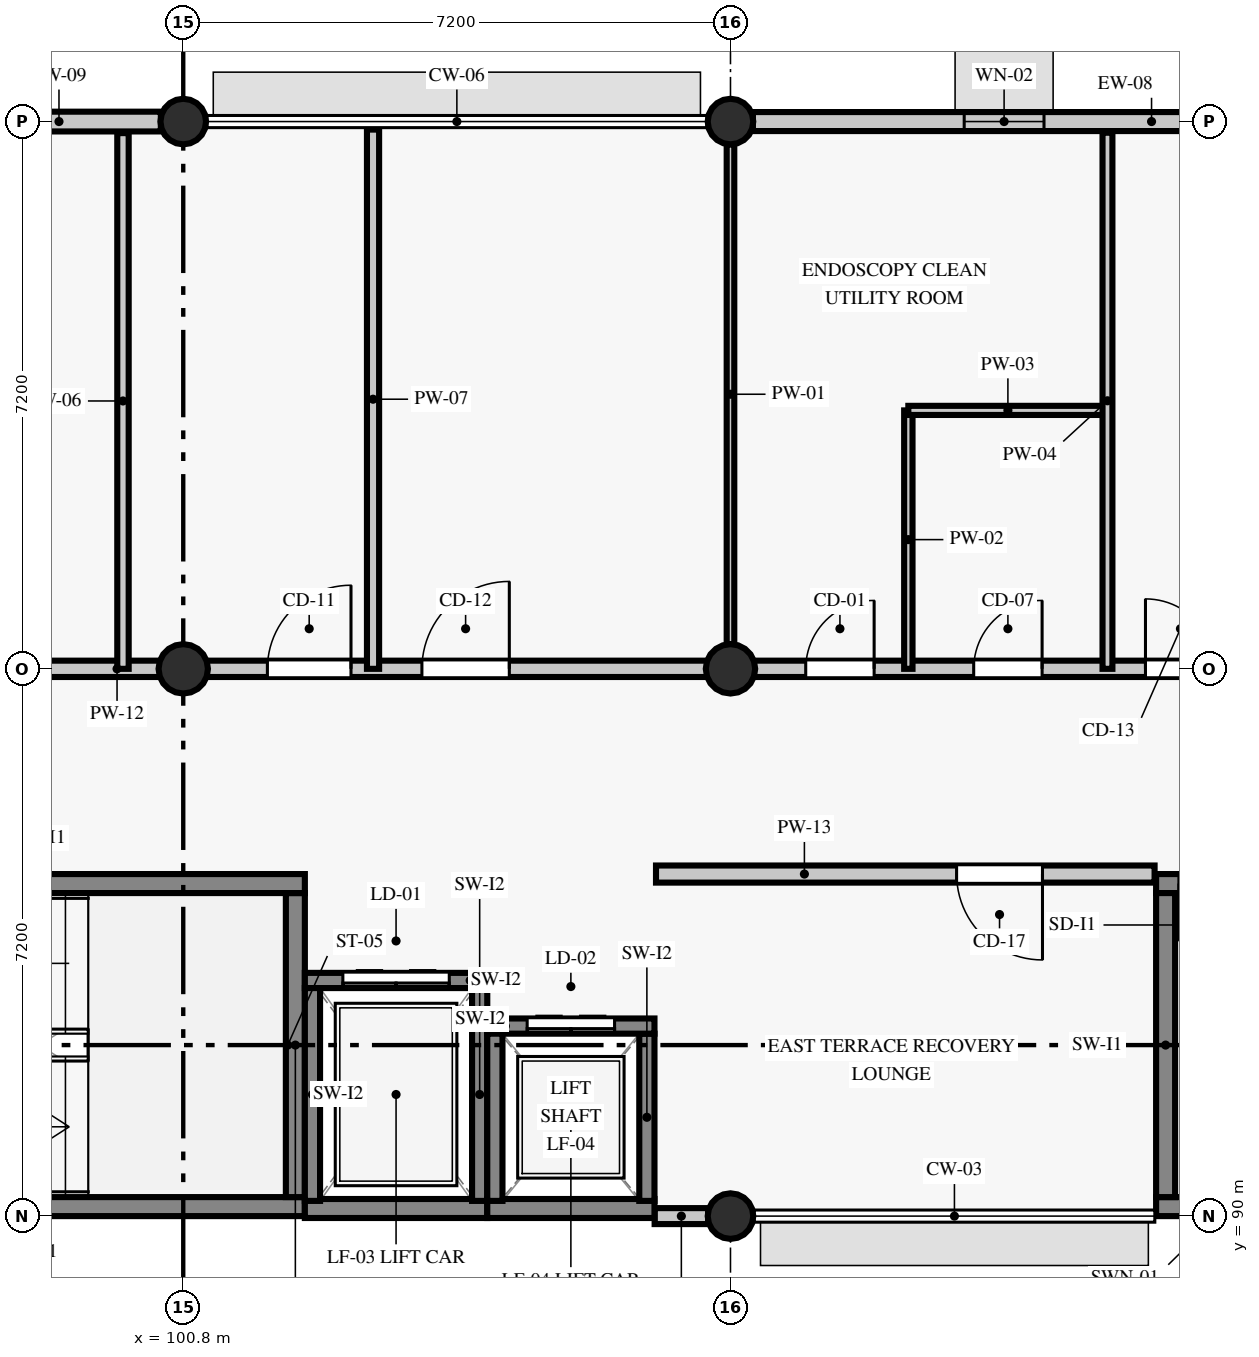
"""IFC4 building model, lengths in metres.
Left out: names, types, materials, properties, quantities, classifications, styles, units other than length and angle.
Written with IfcOpenShell. Run it as: python <this file> out.ifc"""

import sys

from ifc_helpers import new_model, si_unit, direction, frame, frame_2d, origin, origin_2d, place, context, subcontext, project, spatial, rectangle, circle, extrude, element, fill, save


model = new_model("IFC4")
c1 = context("Model", 3, precision=1e-05, world=origin(), true_north=direction((0.0, 1.0)))
c2 = subcontext(c1, "Body", "Model", "MODEL_VIEW")
j1 = project(units=[si_unit("LENGTHUNIT", "METRE"), si_unit("PLANEANGLEUNIT", "RADIAN")], contexts=[c1])
p1 = place(None, origin())
s1 = spatial("IfcSite", under=j1, at=p1, CompositionType="ELEMENT")
p2 = place(p1, origin())
s2 = spatial("IfcBuilding", under=s1, at=p2, CompositionType="ELEMENT")
p3 = place(p2, frame((0.0, 0.0, 9.6)))
s3 = spatial("IfcBuildingStorey", under=s2, at=p3, CompositionType="ELEMENT", Elevation=9.6)
p4 = place(p3, frame((100.8, 97.2, 0.0), z_axis=(0.0, 0.0, 1.0), x_axis=(1.0, 0.0, 0.0)))
e1 = element("IfcColumn", 1, at=p4, inside=s3, PredefinedType="COLUMN", context=c2, shape_type="SweptSolid", body=[
    extrude(circle(Radius=0.325, at=origin_2d()), origin(), (0.0, 0.0, 1.0), 3.925),
])
for number, where, z_axis, x_axis in (
    (2, (100.8, 104.4, 0.0), (0.0, 0.0, 1.0), (1.0, 0.0, 0.0)),
    (3, (108.0, 90.0, 0.0), (0.0, 0.0, 1.0), (1.0, 0.0, 0.0)),
):
    element("IfcColumn", number, at=place(p3, frame(where, z_axis=z_axis, x_axis=x_axis)), inside=s3, PredefinedType="COLUMN", context=c2, shape_type="SweptSolid", body=[
        extrude(circle(Radius=0.3, at=origin_2d()), origin(), (0.0, 0.0, 1.0), 3.925),
    ])
p5 = place(p3, frame((108.0, 97.2, 0.0), z_axis=(0.0, 0.0, 1.0), x_axis=(1.0, 0.0, 0.0)))
e4 = element("IfcColumn", 4, at=p5, inside=s3, PredefinedType="COLUMN", context=c2, shape_type="SweptSolid", body=[
    extrude(circle(Radius=0.325, at=origin_2d()), origin(), (0.0, 0.0, 1.0), 3.925),
])
p6 = place(p3, frame((108.0, 104.4, 0.0), z_axis=(0.0, 0.0, 1.0), x_axis=(1.0, 0.0, 0.0)))
e5 = element("IfcColumn", 5, at=p6, inside=s3, PredefinedType="COLUMN", context=c2, shape_type="SweptSolid", body=[
    extrude(circle(Radius=0.3, at=origin_2d()), origin(), (0.0, 0.0, 1.0), 3.925),
])
p7 = place(p3, frame((107.002, 90.0, 0.0), z_axis=(0.0, 0.0, 1.0), x_axis=(1.0, 0.0, 0.0)))
e6 = element("IfcWall", 6, at=p7, inside=s3, PredefinedType="STANDARD", context=c2, shape_type="SweptSolid", body=[
    extrude(rectangle(XDim=0.703, YDim=0.21, at=frame_2d((0.352, 0.0))), origin(), (0.0, 0.0, 1.0), 3.925),
])
p8 = place(p3, frame((114.905, 104.4, 0.0), z_axis=(0.0, 0.0, 1.0), x_axis=(-1.0, 0.0, 0.0)))
e7 = element("IfcWall", 7, at=p8, inside=s3, PredefinedType="STANDARD", context=c2, shape_type="SweptSolid", body=[
    extrude(rectangle(XDim=6.61, YDim=0.25, at=frame_2d((3.305, 0.0))), origin(), (0.0, 0.0, 1.0), 3.275),
])
p9 = place(p8, frame((2.78, 0.0, 0.9)))
e8 = element("IfcOpeningElement", 8, at=p9, cuts=e7, PredefinedType="OPENING", context=c2, shape_type="SweptSolid", body=[
    extrude(rectangle(XDim=1.05, YDim=1.3, at=frame_2d((0.525, 0.65))), frame((0.0, 0.135, 0.0), z_axis=(0.0, -1.0, 0.0), x_axis=(1.0, 0.0, 0.0)), (0.0, 0.0, 1.0), 0.27),
])
p10 = place(p3, frame((100.505, 104.4, 0.0), z_axis=(0.0, 0.0, 1.0), x_axis=(-1.0, 0.0, 0.0)))
e9 = element("IfcWall", 9, at=p10, inside=s3, PredefinedType="STANDARD", context=c2, shape_type="SweptSolid", body=[
    extrude(rectangle(XDim=6.61, YDim=0.26, at=frame_2d((3.305, 0.0))), origin(), (0.0, 0.0, 1.0), 3.275),
])
p11 = place(p10, frame((2.73, 0.0, 0.9)))
e10 = element("IfcOpeningElement", 10, at=p11, cuts=e9, PredefinedType="OPENING", context=c2, shape_type="SweptSolid", body=[
    extrude(rectangle(XDim=1.15, YDim=1.3, at=frame_2d((0.575, 0.65))), frame((0.0, 0.14, 0.0), z_axis=(0.0, -1.0, 0.0), x_axis=(1.0, 0.0, 0.0)), (0.0, 0.0, 1.0), 0.28),
])
p12 = place(p3, frame((93.6, 90.125, 0.0), z_axis=(0.0, 0.0, 1.0), x_axis=(1.0, 0.0, 0.0)))
e11 = element("IfcWall", 11, at=p12, inside=s3, PredefinedType="SHEAR", context=c2, shape_type="SweptSolid", body=[
    extrude(rectangle(XDim=8.8, YDim=0.25, at=frame_2d((4.4, 0.0))), origin(), (0.0, 0.0, 1.0), 3.925),
])
p13 = place(p12, frame((0.35, 0.0, 0.92)))
e12 = element("IfcOpeningElement", 12, at=p13, cuts=e11, PredefinedType="OPENING", context=c2, shape_type="SweptSolid", body=[
    extrude(rectangle(XDim=1.18, YDim=1.48, at=frame_2d((0.59, 0.74))), frame((0.0, 0.135, 0.0), z_axis=(0.0, -1.0, 0.0), x_axis=(1.0, 0.0, 0.0)), (0.0, 0.0, 1.0), 0.27),
])
p14 = place(p3, frame((102.275, 90.25, 0.0), z_axis=(0.0, 0.0, 1.0), x_axis=(0.0, 1.0, 0.0)))
e13 = element("IfcWall", 13, at=p14, inside=s3, PredefinedType="SHEAR", context=c2, shape_type="SweptSolid", body=[
    extrude(rectangle(XDim=4.0, YDim=0.25, at=frame_2d((2.0, 0.0))), origin(), (0.0, 0.0, 1.0), 3.925),
])
p15 = place(p3, frame((102.4, 94.375, 0.0), z_axis=(0.0, 0.0, 1.0), x_axis=(-1.0, 0.0, 0.0)))
e14 = element("IfcWall", 14, at=p15, inside=s3, PredefinedType="SHEAR", context=c2, shape_type="SweptSolid", body=[
    extrude(rectangle(XDim=8.8, YDim=0.25, at=frame_2d((4.4, 0.0))), origin(), (0.0, 0.0, 1.0), 3.925),
])
p16 = place(p15, frame((7.0, 0.0, 0.0)))
e15 = element("IfcOpeningElement", 15, at=p16, cuts=e14, PredefinedType="OPENING", context=c2, shape_type="SweptSolid", body=[
    extrude(rectangle(XDim=1.5, YDim=2.15, at=frame_2d((0.75, 1.075))), frame((0.0, 0.135, 0.0), z_axis=(0.0, -1.0, 0.0), x_axis=(1.0, 0.0, 0.0)), (0.0, 0.0, 1.0), 0.27),
])
p17 = place(p3, frame((113.6, 90.125, 0.0), z_axis=(0.0, 0.0, 1.0), x_axis=(1.0, 0.0, 0.0)))
e16 = element("IfcWall", 16, at=p17, inside=s3, PredefinedType="SHEAR", context=c2, shape_type="SweptSolid", body=[
    extrude(rectangle(XDim=8.8, YDim=0.25, at=frame_2d((4.4, 0.0))), origin(), (0.0, 0.0, 1.0), 3.925),
])
p18 = place(p17, frame((0.35, 0.0, 0.92)))
e17 = element("IfcOpeningElement", 17, at=p18, cuts=e16, PredefinedType="OPENING", context=c2, shape_type="SweptSolid", body=[
    extrude(rectangle(XDim=1.18, YDim=1.48, at=frame_2d((0.59, 0.74))), frame((0.0, 0.135, 0.0), z_axis=(0.0, -1.0, 0.0), x_axis=(1.0, 0.0, 0.0)), (0.0, 0.0, 1.0), 0.27),
])
p19 = place(p3, frame((122.4, 94.375, 0.0), z_axis=(0.0, 0.0, 1.0), x_axis=(-1.0, 0.0, 0.0)))
e18 = element("IfcWall", 18, at=p19, inside=s3, PredefinedType="SHEAR", context=c2, shape_type="SweptSolid", body=[
    extrude(rectangle(XDim=8.8, YDim=0.25, at=frame_2d((4.4, 0.0))), origin(), (0.0, 0.0, 1.0), 3.925),
])
p20 = place(p19, frame((7.0, 0.0, 0.0)))
e19 = element("IfcOpeningElement", 19, at=p20, cuts=e18, PredefinedType="OPENING", context=c2, shape_type="SweptSolid", body=[
    extrude(rectangle(XDim=1.5, YDim=2.15, at=frame_2d((0.75, 1.075))), frame((0.0, 0.135, 0.0), z_axis=(0.0, -1.0, 0.0), x_axis=(1.0, 0.0, 0.0)), (0.0, 0.0, 1.0), 0.27),
])
p21 = place(p3, frame((113.725, 94.25, 0.0), z_axis=(0.0, 0.0, 1.0), x_axis=(0.0, -1.0, 0.0)))
e20 = element("IfcWall", 20, at=p21, inside=s3, PredefinedType="SHEAR", context=c2, shape_type="SweptSolid", body=[
    extrude(rectangle(XDim=4.0, YDim=0.25, at=frame_2d((2.0, 0.0))), origin(), (0.0, 0.0, 1.0), 3.925),
])
p22 = place(p3, frame((102.4, 90.1, 0.0), z_axis=(0.0, 0.0, 1.0), x_axis=(1.0, 0.0, 0.0)))
e21 = element("IfcWall", 21, at=p22, inside=s3, PredefinedType="SHEAR", context=c2, shape_type="SweptSolid", body=[
    extrude(rectangle(XDim=2.4, YDim=0.25, at=frame_2d((1.2, 0.0))), origin(), (0.0, 0.0, 1.0), 3.925),
])
p23 = place(p3, frame((104.7, 90.2, 0.0), z_axis=(0.0, 0.0, 1.0), x_axis=(0.0, 1.0, 0.0)))
e22 = element("IfcWall", 22, at=p23, inside=s3, PredefinedType="SHEAR", context=c2, shape_type="SweptSolid", body=[
    extrude(rectangle(XDim=2.8, YDim=0.2, at=frame_2d((1.4, 0.0))), origin(), (0.0, 0.0, 1.0), 3.925),
])
p24 = place(p3, frame((104.8, 93.1, 0.0), z_axis=(0.0, 0.0, 1.0), x_axis=(-1.0, 0.0, 0.0)))
e23 = element("IfcWall", 23, at=p24, inside=s3, PredefinedType="SHEAR", context=c2, shape_type="SweptSolid", body=[
    extrude(rectangle(XDim=2.4, YDim=0.2, at=frame_2d((1.2, 0.0))), origin(), (0.0, 0.0, 1.0), 3.925),
])
p25 = place(p24, frame((0.5, 0.0, 0.0)))
e24 = element("IfcOpeningElement", 24, at=p25, cuts=e23, PredefinedType="OPENING", context=c2, shape_type="SweptSolid", body=[
    extrude(rectangle(XDim=1.4, YDim=2.15, at=frame_2d((0.7, 1.075))), frame((0.0, 0.11, 0.0), z_axis=(0.0, -1.0, 0.0), x_axis=(1.0, 0.0, 0.0)), (0.0, 0.0, 1.0), 0.22),
])
p26 = place(p3, frame((102.5, 93.0, 0.0), z_axis=(0.0, 0.0, 1.0), x_axis=(0.0, -1.0, 0.0)))
e25 = element("IfcWall", 25, at=p26, inside=s3, PredefinedType="SHEAR", context=c2, shape_type="SweptSolid", body=[
    extrude(rectangle(XDim=2.8, YDim=0.2, at=frame_2d((1.4, 0.0))), origin(), (0.0, 0.0, 1.0), 3.925),
])
p27 = place(p3, frame((104.8, 90.1, 0.0), z_axis=(0.0, 0.0, 1.0), x_axis=(1.0, 0.0, 0.0)))
e26 = element("IfcWall", 26, at=p27, inside=s3, PredefinedType="SHEAR", context=c2, shape_type="SweptSolid", body=[
    extrude(rectangle(XDim=2.2, YDim=0.25, at=frame_2d((1.1, 0.0))), origin(), (0.0, 0.0, 1.0), 3.925),
])
p28 = place(p3, frame((106.9, 90.2, 0.0), z_axis=(0.0, 0.0, 1.0), x_axis=(0.0, 1.0, 0.0)))
e27 = element("IfcWall", 27, at=p28, inside=s3, PredefinedType="SHEAR", context=c2, shape_type="SweptSolid", body=[
    extrude(rectangle(XDim=2.2, YDim=0.2, at=frame_2d((1.1, 0.0))), origin(), (0.0, 0.0, 1.0), 3.925),
])
p29 = place(p3, frame((107.0, 92.5, 0.0), z_axis=(0.0, 0.0, 1.0), x_axis=(-1.0, 0.0, 0.0)))
e28 = element("IfcWall", 28, at=p29, inside=s3, PredefinedType="SHEAR", context=c2, shape_type="SweptSolid", body=[
    extrude(rectangle(XDim=2.2, YDim=0.2, at=frame_2d((1.1, 0.0))), origin(), (0.0, 0.0, 1.0), 3.925),
])
p30 = place(p29, frame((0.525, 0.0, 0.0)))
e29 = element("IfcOpeningElement", 29, at=p30, cuts=e28, PredefinedType="OPENING", context=c2, shape_type="SweptSolid", body=[
    extrude(rectangle(XDim=1.15, YDim=2.15, at=frame_2d((0.575, 1.075))), frame((0.0, 0.11, 0.0), z_axis=(0.0, -1.0, 0.0), x_axis=(1.0, 0.0, 0.0)), (0.0, 0.0, 1.0), 0.22),
])
p31 = place(p3, frame((104.9, 92.4, 0.0), z_axis=(0.0, 0.0, 1.0), x_axis=(0.0, -1.0, 0.0)))
e30 = element("IfcWall", 30, at=p31, inside=s3, PredefinedType="SHEAR", context=c2, shape_type="SweptSolid", body=[
    extrude(rectangle(XDim=2.2, YDim=0.2, at=frame_2d((1.1, 0.0))), origin(), (0.0, 0.0, 1.0), 3.925),
])
p32 = place(p3, frame((93.9, 97.2, 0.0), z_axis=(0.0, 0.0, 1.0), x_axis=(1.0, 0.0, 0.0)))
e31 = element("IfcWall", 31, at=p32, inside=s3, PredefinedType="PARTITIONING", context=c2, shape_type="SweptSolid", body=[
    extrude(rectangle(XDim=28.2, YDim=0.215, at=frame_2d((14.1, 0.0))), origin(), (0.0, 0.0, 1.0), 3.175),
])
p33 = place(p32, frame((3.001, 0.0, 0.0)))
e32 = element("IfcOpeningElement", 32, at=p33, cuts=e31, PredefinedType="OPENING", context=c2, shape_type="SweptSolid", body=[
    extrude(rectangle(XDim=1.05, YDim=2.13, at=frame_2d((0.525, 1.065))), frame((0.0, 0.117, 0.0), z_axis=(0.0, -1.0, 0.0), x_axis=(1.0, 0.0, 0.0)), (0.0, 0.0, 1.0), 0.235),
])
p34 = place(p32, frame((8.007, 0.0, 0.0)))
e33 = element("IfcOpeningElement", 33, at=p34, cuts=e31, PredefinedType="OPENING", context=c2, shape_type="SweptSolid", body=[
    extrude(rectangle(XDim=1.1, YDim=2.13, at=frame_2d((0.55, 1.065))), frame((0.0, 0.117, 0.0), z_axis=(0.0, -1.0, 0.0), x_axis=(1.0, 0.0, 0.0)), (0.0, 0.0, 1.0), 0.235),
])
p35 = place(p32, frame((10.04, 0.0, 0.0)))
e34 = element("IfcOpeningElement", 34, at=p35, cuts=e31, PredefinedType="OPENING", context=c2, shape_type="SweptSolid", body=[
    extrude(rectangle(XDim=1.15, YDim=2.13, at=frame_2d((0.575, 1.065))), frame((0.0, 0.117, 0.0), z_axis=(0.0, -1.0, 0.0), x_axis=(1.0, 0.0, 0.0)), (0.0, 0.0, 1.0), 0.235),
])
p36 = place(p32, frame((15.09, 0.0, 0.0)))
e35 = element("IfcOpeningElement", 35, at=p36, cuts=e31, PredefinedType="OPENING", context=c2, shape_type="SweptSolid", body=[
    extrude(rectangle(XDim=0.9, YDim=2.08, at=frame_2d((0.45, 1.04))), frame((0.0, 0.117, 0.0), z_axis=(0.0, -1.0, 0.0), x_axis=(1.0, 0.0, 0.0)), (0.0, 0.0, 1.0), 0.235),
])
p37 = place(p32, frame((17.3, 0.0, 0.0)))
e36 = element("IfcOpeningElement", 36, at=p37, cuts=e31, PredefinedType="OPENING", context=c2, shape_type="SweptSolid", body=[
    extrude(rectangle(XDim=0.9, YDim=2.13, at=frame_2d((0.45, 1.065))), frame((0.0, 0.117, 0.0), z_axis=(0.0, -1.0, 0.0), x_axis=(1.0, 0.0, 0.0)), (0.0, 0.0, 1.0), 0.235),
])
p38 = place(p32, frame((19.56, 0.0, 0.0)))
e37 = element("IfcOpeningElement", 37, at=p38, cuts=e31, PredefinedType="OPENING", context=c2, shape_type="SweptSolid", body=[
    extrude(rectangle(XDim=0.92, YDim=2.18, at=frame_2d((0.46, 1.09))), frame((0.0, 0.117, 0.0), z_axis=(0.0, -1.0, 0.0), x_axis=(1.0, 0.0, 0.0)), (0.0, 0.0, 1.0), 0.235),
])
p39 = place(p32, frame((24.318, 0.0, 0.0)))
e38 = element("IfcOpeningElement", 38, at=p39, cuts=e31, PredefinedType="OPENING", context=c2, shape_type="SweptSolid", body=[
    extrude(rectangle(XDim=1.08, YDim=2.18, at=frame_2d((0.54, 1.09))), frame((0.0, 0.117, 0.0), z_axis=(0.0, -1.0, 0.0), x_axis=(1.0, 0.0, 0.0)), (0.0, 0.0, 1.0), 0.235),
])
p40 = place(p3, frame((100.007, 97.2, 0.0), z_axis=(0.0, 0.0, 1.0), x_axis=(0.0, 1.0, 0.0)))
e39 = element("IfcWall", 39, at=p40, inside=s3, PredefinedType="PARTITIONING", context=c2, shape_type="SweptSolid", body=[
    extrude(rectangle(XDim=7.048, YDim=0.15, at=frame_2d((3.524, 0.0))), origin(), (0.0, 0.0, 1.0), 3.175),
])
p41 = place(p3, frame((103.297, 97.2, 0.0), z_axis=(0.0, 0.0, 1.0), x_axis=(0.0, 1.0, 0.0)))
e40 = element("IfcWall", 40, at=p41, inside=s3, PredefinedType="PARTITIONING", context=c2, shape_type="SweptSolid", body=[
    extrude(rectangle(XDim=7.094, YDim=0.16, at=frame_2d((3.547, 0.0))), origin(), (0.0, 0.0, 1.0), 3.175),
])
p42 = place(p3, frame((108.0, 97.525, 0.0), z_axis=(0.0, 0.0, 1.0), x_axis=(0.0, 1.0, 0.0)))
e41 = element("IfcWall", 41, at=p42, inside=s3, PredefinedType="PARTITIONING", context=c2, shape_type="SweptSolid", body=[
    extrude(rectangle(XDim=6.575, YDim=0.1, at=frame_2d((3.288, 0.0))), origin(), (0.0, 0.0, 1.0), 3.375),
])
p43 = place(p3, frame((110.34, 97.2, 0.0), z_axis=(0.0, 0.0, 1.0), x_axis=(0.0, 1.0, 0.0)))
e42 = element("IfcWall", 42, at=p43, inside=s3, PredefinedType="PARTITIONING", context=c2, shape_type="SweptSolid", body=[
    extrude(rectangle(XDim=3.4, YDim=0.11, at=frame_2d((1.7, 0.0))), origin(), (0.0, 0.0, 1.0), 3.175),
])
p44 = place(p3, frame((110.34, 100.6, 0.0), z_axis=(0.0, 0.0, 1.0), x_axis=(1.0, 0.0, 0.0)))
e43 = element("IfcWall", 43, at=p44, inside=s3, PredefinedType="PARTITIONING", context=c2, shape_type="SweptSolid", body=[
    extrude(rectangle(XDim=2.62, YDim=0.12, at=frame_2d((1.31, 0.0))), origin(), (0.0, 0.0, 1.0), 3.925),
])
p45 = place(p3, frame((112.96, 97.2, 0.0), z_axis=(0.0, 0.0, 1.0), x_axis=(0.0, 1.0, 0.0)))
e44 = element("IfcWall", 44, at=p45, inside=s3, PredefinedType="PARTITIONING", context=c2, shape_type="SweptSolid", body=[
    extrude(rectangle(XDim=7.053, YDim=0.13, at=frame_2d((3.526, 0.0))), origin(), (0.0, 0.0, 1.0), 3.175),
])
p46 = place(p3, frame((107.02, 94.5, 0.0), z_axis=(0.0, 0.0, 1.0), x_axis=(1.0, 0.0, 0.0)))
e45 = element("IfcWall", 45, at=p46, inside=s3, PredefinedType="PARTITIONING", context=c2, shape_type="SweptSolid", body=[
    extrude(rectangle(XDim=6.56, YDim=0.225, at=frame_2d((3.28, 0.0))), origin(), (0.0, 0.0, 1.0), 3.375),
])
p47 = place(p46, frame((3.955, 0.0, 0.0)))
e46 = element("IfcOpeningElement", 46, at=p47, cuts=e45, PredefinedType="OPENING", context=c2, shape_type="SweptSolid", body=[
    extrude(rectangle(XDim=1.13, YDim=2.18, at=frame_2d((0.565, 1.09))), frame((0.0, 0.123, 0.0), z_axis=(0.0, -1.0, 0.0), x_axis=(1.0, 0.0, 0.0)), (0.0, 0.0, 1.0), 0.245),
])
p48 = place(p9, origin())
e47 = element("IfcWindow", 47, at=p48, inside=s3, PartitioningType="SINGLE_PANEL", PredefinedType="WINDOW", context=c2, shape_type="SweptSolid", body=[
    extrude(rectangle(XDim=1.05, YDim=1.3, at=frame_2d((0.525, 0.65))), frame((0.0, 0.03, 0.0), z_axis=(0.0, -1.0, 0.0), x_axis=(1.0, 0.0, 0.0)), (0.0, 0.0, 1.0), 0.06),
])
fill(e8, e47)
p49 = place(p25, frame((1.4, 0.0, 0.0), z_axis=(0.0, 0.0, 1.0), x_axis=(-1.0, 0.0, 0.0)))
e48 = element("IfcDoor", 48, at=p49, inside=s3, OperationType="DOUBLE_DOOR_SLIDING", PredefinedType="DOOR", context=c2, shape_type="SweptSolid", body=[
    extrude(rectangle(XDim=1.4, YDim=2.15, at=frame_2d((0.7, 1.075))), frame((0.0, 0.025, 0.0), z_axis=(0.0, -1.0, 0.0), x_axis=(1.0, 0.0, 0.0)), (0.0, 0.0, 1.0), 0.05),
])
fill(e24, e48)
p50 = place(p30, frame((1.15, 0.0, 0.0), z_axis=(0.0, 0.0, 1.0), x_axis=(-1.0, 0.0, 0.0)))
e49 = element("IfcDoor", 49, at=p50, inside=s3, OperationType="DOUBLE_DOOR_SLIDING", PredefinedType="DOOR", context=c2, shape_type="SweptSolid", body=[
    extrude(rectangle(XDim=1.15, YDim=2.15, at=frame_2d((0.575, 1.075))), frame((0.0, 0.025, 0.0), z_axis=(0.0, -1.0, 0.0), x_axis=(1.0, 0.0, 0.0)), (0.0, 0.0, 1.0), 0.05),
])
fill(e29, e49)
p51 = place(p34, origin())
e50 = element("IfcDoor", 50, at=p51, inside=s3, OperationType="SINGLE_SWING_RIGHT", PredefinedType="DOOR", context=c2, shape_type="SweptSolid", body=[
    extrude(rectangle(XDim=1.1, YDim=2.13, at=frame_2d((0.55, 1.065))), frame((0.0, 0.025, 0.0), z_axis=(0.0, -1.0, 0.0), x_axis=(1.0, 0.0, 0.0)), (0.0, 0.0, 1.0), 0.05),
])
fill(e33, e50)
p52 = place(p35, origin())
e51 = element("IfcDoor", 51, at=p52, inside=s3, OperationType="SINGLE_SWING_RIGHT", PredefinedType="DOOR", context=c2, shape_type="SweptSolid", body=[
    extrude(rectangle(XDim=1.15, YDim=2.13, at=frame_2d((0.575, 1.065))), frame((0.0, 0.025, 0.0), z_axis=(0.0, -1.0, 0.0), x_axis=(1.0, 0.0, 0.0)), (0.0, 0.0, 1.0), 0.05),
])
fill(e34, e51)
p53 = place(p36, origin())
e52 = element("IfcDoor", 52, at=p53, inside=s3, OperationType="SINGLE_SWING_RIGHT", PredefinedType="DOOR", context=c2, shape_type="SweptSolid", body=[
    extrude(rectangle(XDim=0.9, YDim=2.08, at=frame_2d((0.45, 1.04))), frame((0.0, 0.025, 0.0), z_axis=(0.0, -1.0, 0.0), x_axis=(1.0, 0.0, 0.0)), (0.0, 0.0, 1.0), 0.05),
])
fill(e35, e52)
p54 = place(p37, origin())
e53 = element("IfcDoor", 53, at=p54, inside=s3, OperationType="SINGLE_SWING_RIGHT", PredefinedType="DOOR", context=c2, shape_type="SweptSolid", body=[
    extrude(rectangle(XDim=0.9, YDim=2.13, at=frame_2d((0.45, 1.065))), frame((0.0, 0.025, 0.0), z_axis=(0.0, -1.0, 0.0), x_axis=(1.0, 0.0, 0.0)), (0.0, 0.0, 1.0), 0.05),
])
fill(e36, e53)
p55 = place(p38, origin())
e54 = element("IfcDoor", 54, at=p55, inside=s3, OperationType="SINGLE_SWING_LEFT", PredefinedType="DOOR", context=c2, shape_type="SweptSolid", body=[
    extrude(rectangle(XDim=0.92, YDim=2.18, at=frame_2d((0.46, 1.09))), frame((0.0, 0.025, 0.0), z_axis=(0.0, -1.0, 0.0), x_axis=(1.0, 0.0, 0.0)), (0.0, 0.0, 1.0), 0.05),
])
fill(e37, e54)
p56 = place(p47, frame((1.13, 0.0, 0.0), z_axis=(0.0, 0.0, 1.0), x_axis=(-1.0, 0.0, 0.0)))
e55 = element("IfcDoor", 55, at=p56, inside=s3, OperationType="SINGLE_SWING_LEFT", PredefinedType="DOOR", context=c2, shape_type="SweptSolid", body=[
    extrude(rectangle(XDim=1.13, YDim=2.18, at=frame_2d((0.565, 1.09))), frame((0.0, 0.025, 0.0), z_axis=(0.0, -1.0, 0.0), x_axis=(1.0, 0.0, 0.0)), (0.0, 0.0, 1.0), 0.05),
])
fill(e46, e55)
save(model, sys.argv[1])
